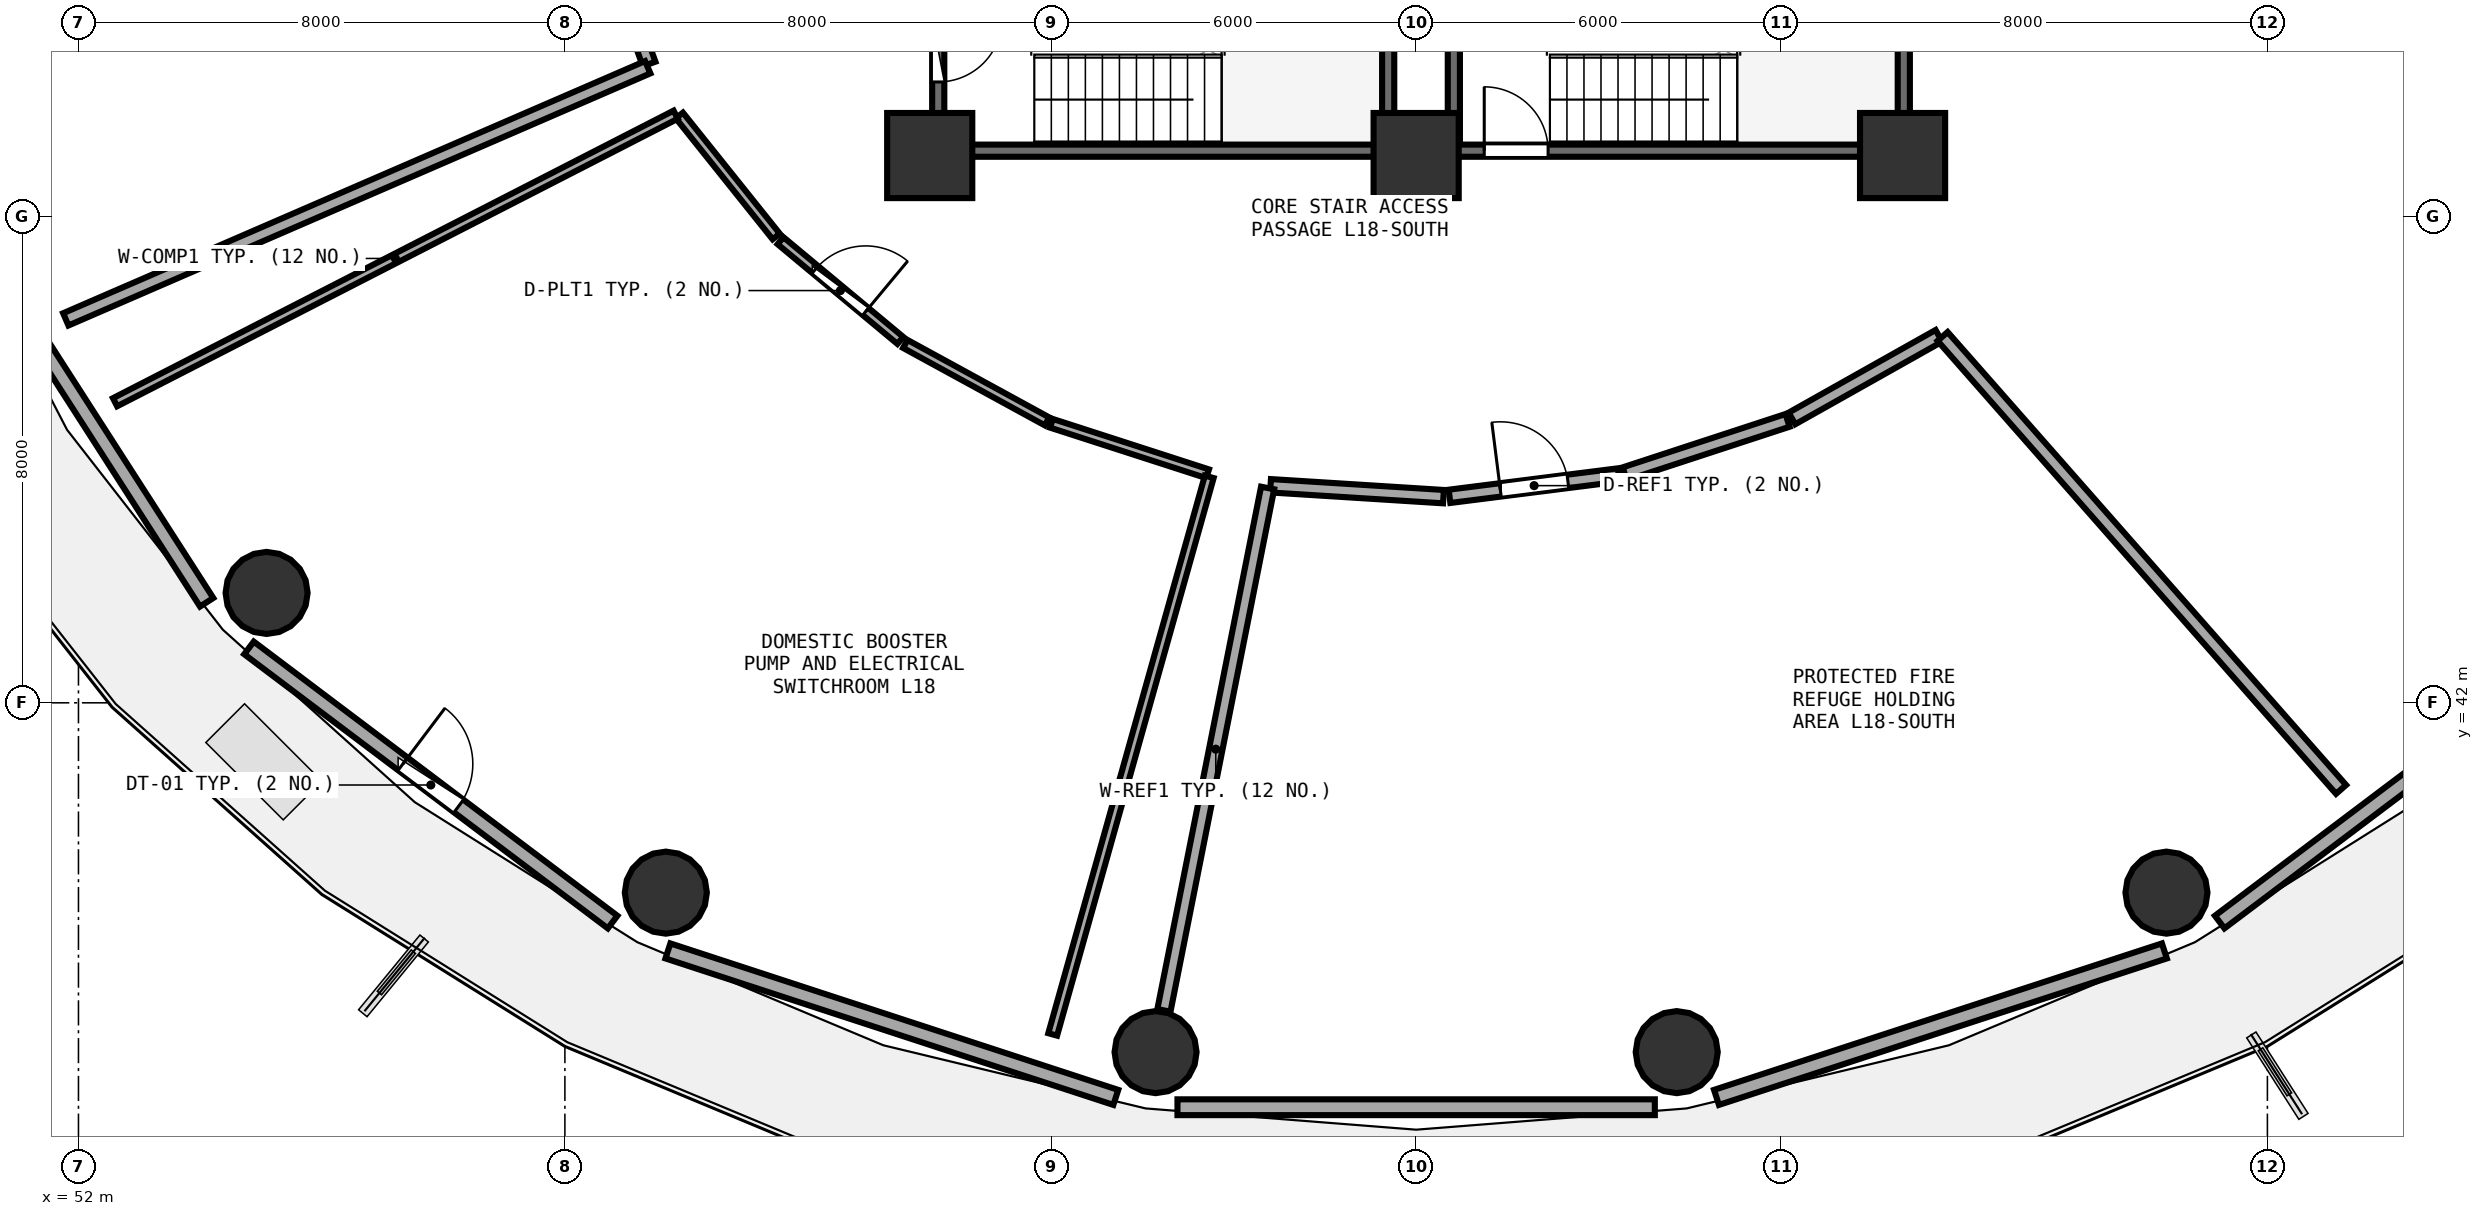
"""IFC4 building model, lengths in metres.
Left out: names, types, materials, properties, quantities, classifications, styles, units other than length and angle.
Written with IfcOpenShell. Run it as: python <this file> out.ifc"""

import sys

from ifc_helpers import new_model, si_unit, direction, frame, frame_2d, origin, origin_2d, place, context, subcontext, project, spatial, rectangle, circle, extrude, element, fill, save


model = new_model("IFC4")
c1 = context("Model", 3, precision=1e-05, world=origin(), true_north=direction((0.0, 1.0)))
c2 = subcontext(c1, "Body", "Model", "MODEL_VIEW")
j1 = project(units=[si_unit("LENGTHUNIT", "METRE"), si_unit("PLANEANGLEUNIT", "RADIAN")], contexts=[c1])
p1 = place(None, origin())
s1 = spatial("IfcSite", under=j1, at=p1, CompositionType="ELEMENT")
p2 = place(p1, origin())
s2 = spatial("IfcBuilding", under=s1, at=p2, CompositionType="ELEMENT")
p3 = place(p2, frame((0.0, 0.0, 72.26)))
s3 = spatial("IfcBuildingStorey", under=s2, at=p3, CompositionType="ELEMENT", Elevation=72.26)
for number, where, z_axis, x_axis in (
    (1, (66.0, 51.0, 0.0), (0.0, 0.0, 1.0), (1.0, 0.0, 0.0)),
    (2, (74.0, 51.0, 0.0), (0.0, 0.0, 1.0), (1.0, 0.0, 0.0)),
    (3, (82.0, 51.0, 0.0), (0.0, 0.0, 1.0), (1.0, 0.0, 0.0)),
):
    element("IfcColumn", number, at=place(p3, frame(where, z_axis=z_axis, x_axis=x_axis)), inside=s3, PredefinedType="PILASTER", context=c2, shape_type="SweptSolid", body=[
        extrude(rectangle(XDim=1.4, YDim=1.4, at=origin_2d()), origin(), (0.0, 0.0, 1.0), 4.09),
    ])
for number, where, z_axis, x_axis in (
    (4, (55.094, 43.807, 0.0), (0.0, 0.0, 1.0), (1.0, 0.0, 0.0)),
    (5, (61.66, 38.878, 0.0), (0.0, 0.0, 1.0), (1.0, 0.0, 0.0)),
    (6, (69.714, 36.255, 0.0), (0.0, 0.0, 1.0), (1.0, 0.0, 0.0)),
    (7, (78.286, 36.255, 0.0), (0.0, 0.0, 1.0), (1.0, 0.0, 0.0)),
    (8, (86.34, 38.878, 0.0), (0.0, 0.0, 1.0), (1.0, 0.0, 0.0)),
):
    element("IfcColumn", number, at=place(p3, frame(where, z_axis=z_axis, x_axis=x_axis)), inside=s3, PredefinedType="COLUMN", context=c2, shape_type="SweptSolid", body=[
        extrude(circle(Radius=0.675, at=origin_2d()), origin(), (0.0, 0.0, 1.0), 4.09),
    ])
p4 = place(p3, frame((50.225, 49.696, 0.0), z_axis=(0.0, 0.0, 1.0), x_axis=(0.540604690505, -0.841276749116, 0.0)))
e9 = element("IfcWall", 9, at=p4, inside=s3, PredefinedType="SOLIDWALL", context=c2, shape_type="SweptSolid", body=[
    extrude(rectangle(XDim=7.183, YDim=0.26, at=frame_2d((3.591, 0.0))), origin(), (0.0, 0.0, 1.0), 3.815),
])
p5 = place(p3, frame((54.804, 42.903, 0.0), z_axis=(0.0, 0.0, 1.0), x_axis=(0.798511093866, -0.601980093502, 0.0)))
e10 = element("IfcWall", 10, at=p5, inside=s3, PredefinedType="SOLIDWALL", context=c2, shape_type="SweptSolid", body=[
    extrude(rectangle(XDim=7.49, YDim=0.26, at=frame_2d((3.745, 0.0))), origin(), (0.0, 0.0, 1.0), 3.815),
])
p6 = place(p5, frame((3.17, 0.0, 0.0)))
e11 = element("IfcOpeningElement", 11, at=p6, cuts=e10, PredefinedType="OPENING", context=c2, shape_type="SweptSolid", body=[
    extrude(rectangle(XDim=1.15, YDim=2.15, at=frame_2d((0.575, 1.075))), frame((0.0, 0.14, 0.0), z_axis=(0.0, -1.0, 0.0), x_axis=(1.0, 0.0, 0.0)), (0.0, 0.0, 1.0), 0.28),
])
p7 = place(p3, frame((61.694, 37.92, 0.0), z_axis=(0.0, 0.0, 1.0), x_axis=(0.950466692879, -0.310826423792, 0.0)))
e12 = element("IfcWall", 12, at=p7, inside=s3, PredefinedType="SOLIDWALL", context=c2, shape_type="SweptSolid", body=[
    extrude(rectangle(XDim=7.75, YDim=0.26, at=frame_2d((3.875, 0.0))), origin(), (0.0, 0.0, 1.0), 3.815),
])
p8 = place(p3, frame((70.075, 35.349, 0.0), z_axis=(0.0, 0.0, 1.0), x_axis=(1.0, 0.0, 0.0)))
e13 = element("IfcWall", 13, at=p8, inside=s3, PredefinedType="SOLIDWALL", context=c2, shape_type="SweptSolid", body=[
    extrude(rectangle(XDim=7.851, YDim=0.26, at=frame_2d((3.925, 0.0))), origin(), (0.0, 0.0, 1.0), 3.815),
])
p9 = place(p3, frame((78.94, 35.511, 0.0), z_axis=(0.0, 0.0, 1.0), x_axis=(0.950466692879, 0.310826423792, 0.0)))
e14 = element("IfcWall", 14, at=p9, inside=s3, PredefinedType="SOLIDWALL", context=c2, shape_type="SweptSolid", body=[
    extrude(rectangle(XDim=7.75, YDim=0.26, at=frame_2d((3.875, 0.0))), origin(), (0.0, 0.0, 1.0), 3.815),
])
p10 = place(p3, frame((87.215, 38.394, 0.0), z_axis=(0.0, 0.0, 1.0), x_axis=(0.798511093866, 0.601980093502, 0.0)))
e15 = element("IfcWall", 15, at=p10, inside=s3, PredefinedType="SOLIDWALL", context=c2, shape_type="SweptSolid", body=[
    extrude(rectangle(XDim=7.49, YDim=0.26, at=frame_2d((3.745, 0.0))), origin(), (0.0, 0.0, 1.0), 3.815),
])
p11 = place(p3, frame((74.0, 51.08, 0.0), z_axis=(0.0, 0.0, 1.0), x_axis=(1.0, 0.0, 0.0)))
e16 = element("IfcWall", 16, at=p11, inside=s3, PredefinedType="SHEAR", context=c2, shape_type="SweptSolid", body=[
    extrude(rectangle(XDim=7.9, YDim=0.2, at=frame_2d((3.95, 0.0))), origin(), (0.0, 0.0, 1.0), 3.83),
])
p12 = place(p11, frame((1.12, 0.0, 0.0)))
e17 = element("IfcOpeningElement", 17, at=p12, cuts=e16, PredefinedType="OPENING", context=c2, shape_type="SweptSolid", body=[
    extrude(rectangle(XDim=1.05, YDim=2.1, at=frame_2d((0.525, 1.05))), frame((0.0, 0.11, 0.0), z_axis=(0.0, -1.0, 0.0), x_axis=(1.0, 0.0, 0.0)), (0.0, 0.0, 1.0), 0.22),
])
for number, where, z_axis, x_axis in (
    (18, (82.02, 51.2, 0.0), (0.0, 0.0, 1.0), (0.0, 1.0, 0.0)),
    (19, (74.62, 54.27, 0.0), (0.0, 0.0, 1.0), (0.0, -1.0, 0.0)),
):
    element("IfcWall", number, at=place(p3, frame(where, z_axis=z_axis, x_axis=x_axis)), inside=s3, PredefinedType="SHEAR", context=c2, shape_type="SweptSolid", body=[
        extrude(rectangle(XDim=3.07, YDim=0.2, at=frame_2d((1.535, 0.0))), origin(), (0.0, 0.0, 1.0), 3.83),
    ])
p13 = place(p3, frame((66.26, 51.08, 0.0), z_axis=(0.0, 0.0, 1.0), x_axis=(1.0, 0.0, 0.0)))
e20 = element("IfcWall", 20, at=p13, inside=s3, PredefinedType="SHEAR", context=c2, shape_type="SweptSolid", body=[
    extrude(rectangle(XDim=7.16, YDim=0.2, at=frame_2d((3.58, 0.0))), origin(), (0.0, 0.0, 1.0), 3.83),
])
p14 = place(p3, frame((73.54, 51.2, 0.0), z_axis=(0.0, 0.0, 1.0), x_axis=(0.0, 1.0, 0.0)))
e21 = element("IfcWall", 21, at=p14, inside=s3, PredefinedType="SHEAR", context=c2, shape_type="SweptSolid", body=[
    extrude(rectangle(XDim=3.07, YDim=0.2, at=frame_2d((1.535, 0.0))), origin(), (0.0, 0.0, 1.0), 3.83),
])
p15 = place(p3, frame((66.14, 54.27, 0.0), z_axis=(0.0, 0.0, 1.0), x_axis=(0.0, -1.0, 0.0)))
e22 = element("IfcWall", 22, at=p15, inside=s3, PredefinedType="SHEAR", context=c2, shape_type="SweptSolid", body=[
    extrude(rectangle(XDim=3.07, YDim=0.2, at=frame_2d((1.535, 0.0))), origin(), (0.0, 0.0, 1.0), 3.83),
])
p16 = place(p15, frame((1.01, 0.0, 0.0)))
e23 = element("IfcOpeningElement", 23, at=p16, cuts=e22, PredefinedType="OPENING", context=c2, shape_type="SweptSolid", body=[
    extrude(rectangle(XDim=1.05, YDim=2.1, at=frame_2d((0.525, 1.05))), frame((0.0, 0.11, 0.0), z_axis=(0.0, -1.0, 0.0), x_axis=(1.0, 0.0, 0.0)), (0.0, 0.0, 1.0), 0.22),
])
p17 = place(p3, frame((63.546, 49.6, 0.0), z_axis=(0.0, 0.0, 1.0), x_axis=(0.768626986837, -0.639697237063, 0.0)))
e24 = element("IfcWall", 24, at=p17, inside=s3, PredefinedType="PARTITIONING", context=c2, shape_type="SweptSolid", body=[
    extrude(rectangle(XDim=2.564, YDim=0.15, at=frame_2d((1.282, 0.0))), origin(), (0.0, 0.0, 1.0), 3.265),
])
p18 = place(p17, frame((0.742, 0.0, 0.0)))
e25 = element("IfcOpeningElement", 25, at=p18, cuts=e24, PredefinedType="OPENING", context=c2, shape_type="SweptSolid", body=[
    extrude(rectangle(XDim=1.08, YDim=2.1, at=frame_2d((0.54, 1.05))), frame((0.0, 0.085, 0.0), z_axis=(0.0, -1.0, 0.0), x_axis=(1.0, 0.0, 0.0)), (0.0, 0.0, 1.0), 0.17),
])
p19 = place(p3, frame((74.549, 45.396, 0.0), z_axis=(0.0, 0.0, 1.0), x_axis=(0.992098832507, 0.125458784221, 0.0)))
e26 = element("IfcWall", 26, at=p19, inside=s3, PredefinedType="SOLIDWALL", context=c2, shape_type="SweptSolid", body=[
    extrude(rectangle(XDim=2.806, YDim=0.22, at=frame_2d((1.403, 0.0))), origin(), (0.0, 0.0, 1.0), 3.575),
])
p20 = place(p19, frame((0.843, 0.0, 0.0)))
e27 = element("IfcOpeningElement", 27, at=p20, cuts=e26, PredefinedType="OPENING", context=c2, shape_type="SweptSolid", body=[
    extrude(rectangle(XDim=1.12, YDim=2.1, at=frame_2d((0.56, 1.05))), frame((0.0, 0.12, 0.0), z_axis=(0.0, -1.0, 0.0), x_axis=(1.0, 0.0, 0.0)), (0.0, 0.0, 1.0), 0.24),
])
p21 = place(p3, frame((60.207, 55.771, 0.0), z_axis=(0.0, 0.0, 1.0), x_axis=(0.339545974416, -0.940589459466, 0.0)))
e28 = element("IfcWall", 28, at=p21, inside=s3, PredefinedType="SOLIDWALL", context=c2, shape_type="SweptSolid", body=[
    extrude(rectangle(XDim=3.472, YDim=0.22, at=frame_2d((1.736, 0.0))), origin(), (0.0, 0.0, 1.0), 3.82),
])
p22 = place(p3, frame((61.362, 52.452, 0.0), z_axis=(0.0, 0.0, 1.0), x_axis=(-0.917590634209, -0.397526638116, 0.0)))
e29 = element("IfcWall", 29, at=p22, inside=s3, PredefinedType="SOLIDWALL", context=c2, shape_type="SweptSolid", body=[
    extrude(rectangle(XDim=10.43, YDim=0.22, at=frame_2d((5.215, 0.0))), origin(), (0.0, 0.0, 1.0), 3.265),
])
p23 = place(p3, frame((61.883, 51.659, 0.0), z_axis=(0.0, 0.0, 1.0), x_axis=(0.62480020311, -0.780784673385, 0.0)))
e30 = element("IfcWall", 30, at=p23, inside=s3, PredefinedType="PARTITIONING", context=c2, shape_type="SweptSolid", body=[
    extrude(rectangle(XDim=2.548, YDim=0.15, at=frame_2d((1.274, 0.0))), origin(), (0.0, 0.0, 1.0), 3.265),
])
p24 = place(p3, frame((65.598, 47.902, 0.0), z_axis=(0.0, 0.0, 1.0), x_axis=(0.877526475728, -0.479528189366, 0.0)))
e31 = element("IfcWall", 31, at=p24, inside=s3, PredefinedType="PARTITIONING", context=c2, shape_type="SweptSolid", body=[
    extrude(rectangle(XDim=2.656, YDim=0.15, at=frame_2d((1.328, 0.0))), origin(), (0.0, 0.0, 1.0), 3.265),
])
p25 = place(p3, frame((68.002, 46.597, 0.0), z_axis=(0.0, 0.0, 1.0), x_axis=(0.951591716266, -0.307364938686, 0.0)))
e32 = element("IfcWall", 32, at=p25, inside=s3, PredefinedType="PARTITIONING", context=c2, shape_type="SweptSolid", body=[
    extrude(rectangle(XDim=2.698, YDim=0.15, at=frame_2d((1.349, 0.0))), origin(), (0.0, 0.0, 1.0), 3.82),
])
p26 = place(p3, frame((70.597, 45.717, 0.0), z_axis=(0.0, 0.0, 1.0), x_axis=(-0.270293489238, -0.962777975275, 0.0)))
e33 = element("IfcWall", 33, at=p26, inside=s3, PredefinedType="PARTITIONING", context=c2, shape_type="SweptSolid", body=[
    extrude(rectangle(XDim=9.525, YDim=0.15, at=frame_2d((4.762, 0.0))), origin(), (0.0, 0.0, 1.0), 3.265),
])
p27 = place(p3, frame((52.602, 46.943, 0.0), z_axis=(0.0, 0.0, 1.0), x_axis=(0.889833896524, 0.456284600439, 0.0)))
e34 = element("IfcWall", 34, at=p27, inside=s3, PredefinedType="PARTITIONING", context=c2, shape_type="SweptSolid", body=[
    extrude(rectangle(XDim=10.363, YDim=0.15, at=frame_2d((5.181, 0.0))), origin(), (0.0, 0.0, 1.0), 3.265),
])
p28 = place(p3, frame((71.605, 45.57, 0.0), z_axis=(0.0, 0.0, 1.0), x_axis=(0.998021119096, -0.062879613855, 0.0)))
e35 = element("IfcWall", 35, at=p28, inside=s3, PredefinedType="SOLIDWALL", context=c2, shape_type="SweptSolid", body=[
    extrude(rectangle(XDim=2.85, YDim=0.22, at=frame_2d((1.425, 0.0))), origin(), (0.0, 0.0, 1.0), 3.575),
])
p29 = place(p3, frame((77.43, 45.768, 0.0), z_axis=(0.0, 0.0, 1.0), x_axis=(0.950342166159, 0.311206952397, 0.0)))
e36 = element("IfcWall", 36, at=p29, inside=s3, PredefinedType="SOLIDWALL", context=c2, shape_type="SweptSolid", body=[
    extrude(rectangle(XDim=2.818, YDim=0.22, at=frame_2d((1.409, 0.0))), origin(), (0.0, 0.0, 1.0), 3.82),
])
p30 = place(p3, frame((80.181, 46.677, 0.0), z_axis=(0.0, 0.0, 1.0), x_axis=(0.87161551792, 0.49019015588, 0.0)))
e37 = element("IfcWall", 37, at=p30, inside=s3, PredefinedType="SOLIDWALL", context=c2, shape_type="SweptSolid", body=[
    extrude(rectangle(XDim=2.772, YDim=0.22, at=frame_2d((1.386, 0.0))), origin(), (0.0, 0.0, 1.0), 3.265),
])
p31 = place(p3, frame((82.658, 48.025, 0.0), z_axis=(0.0, 0.0, 1.0), x_axis=(0.660521380373, -0.750807236293, 0.0)))
e38 = element("IfcWall", 38, at=p31, inside=s3, PredefinedType="SOLIDWALL", context=c2, shape_type="SweptSolid", body=[
    extrude(rectangle(XDim=9.921, YDim=0.22, at=frame_2d((4.961, 0.0))), origin(), (0.0, 0.0, 1.0), 3.265),
])
p32 = place(p3, frame((69.852, 36.942, 0.0), z_axis=(0.0, 0.0, 1.0), x_axis=(0.194706106276, 0.980861627437, 0.0)))
e39 = element("IfcWall", 39, at=p32, inside=s3, PredefinedType="SOLIDWALL", context=c2, shape_type="SweptSolid", body=[
    extrude(rectangle(XDim=8.759, YDim=0.22, at=frame_2d((4.379, 0.0))), origin(), (0.0, 0.0, 1.0), 3.515),
])
p33 = place(p6, frame((1.15, 0.0, 0.0), z_axis=(0.0, 0.0, 1.0), x_axis=(-1.0, 0.0, 0.0)))
e40 = element("IfcDoor", 40, at=p33, inside=s3, OperationType="SINGLE_SWING_RIGHT", PredefinedType="DOOR", context=c2, shape_type="SweptSolid", body=[
    extrude(rectangle(XDim=1.15, YDim=2.15, at=frame_2d((0.575, 1.075))), frame((0.0, 0.025, 0.0), z_axis=(0.0, -1.0, 0.0), x_axis=(1.0, 0.0, 0.0)), (0.0, 0.0, 1.0), 0.05),
])
fill(e11, e40)
p34 = place(p12, origin())
e41 = element("IfcDoor", 41, at=p34, inside=s3, OperationType="SINGLE_SWING_LEFT", PredefinedType="DOOR", context=c2, shape_type="SweptSolid", body=[
    extrude(rectangle(XDim=1.05, YDim=2.1, at=frame_2d((0.525, 1.05))), frame((0.0, 0.025, 0.0), z_axis=(0.0, -1.0, 0.0), x_axis=(1.0, 0.0, 0.0)), (0.0, 0.0, 1.0), 0.05),
])
fill(e17, e41)
p35 = place(p16, origin())
e42 = element("IfcDoor", 42, at=p35, inside=s3, OperationType="SINGLE_SWING_LEFT", PredefinedType="DOOR", context=c2, shape_type="SweptSolid", body=[
    extrude(rectangle(XDim=1.05, YDim=2.1, at=frame_2d((0.525, 1.05))), frame((0.0, 0.025, 0.0), z_axis=(0.0, -1.0, 0.0), x_axis=(1.0, 0.0, 0.0)), (0.0, 0.0, 1.0), 0.05),
])
fill(e23, e42)
p36 = place(p18, origin())
e43 = element("IfcDoor", 43, at=p36, inside=s3, OperationType="SINGLE_SWING_RIGHT", PredefinedType="DOOR", context=c2, shape_type="SweptSolid", body=[
    extrude(rectangle(XDim=1.08, YDim=2.1, at=frame_2d((0.54, 1.05))), frame((0.0, 0.025, 0.0), z_axis=(0.0, -1.0, 0.0), x_axis=(1.0, 0.0, 0.0)), (0.0, 0.0, 1.0), 0.05),
])
fill(e25, e43)
p37 = place(p20, origin())
e44 = element("IfcDoor", 44, at=p37, inside=s3, OperationType="SINGLE_SWING_LEFT", PredefinedType="DOOR", context=c2, shape_type="SweptSolid", body=[
    extrude(rectangle(XDim=1.12, YDim=2.1, at=frame_2d((0.56, 1.05))), frame((0.0, 0.025, 0.0), z_axis=(0.0, -1.0, 0.0), x_axis=(1.0, 0.0, 0.0)), (0.0, 0.0, 1.0), 0.05),
])
fill(e27, e44)
save(model, sys.argv[1])
